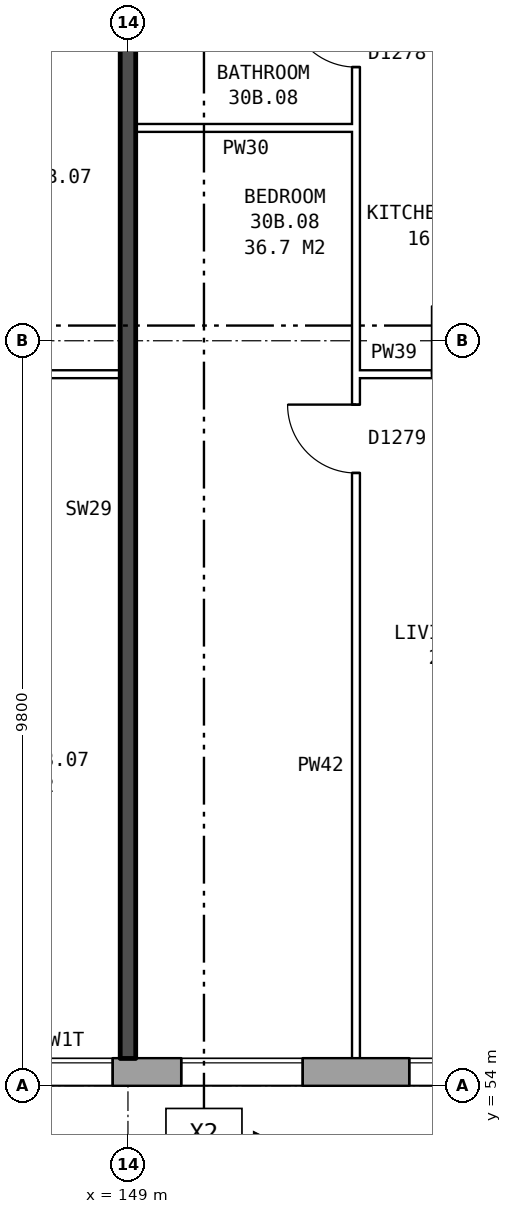
"""IFC4 building model, lengths in metres.
Left out: names, types, materials, properties, quantities, classifications, styles, units other than length and angle.
Written with IfcOpenShell. Run it as: python <this file> out.ifc"""

import sys

from ifc_helpers import new_model, si_unit, direction, frame, frame_2d, origin, place, context, subcontext, project, spatial, rectangle, extrude, element, fill, save


model = new_model("IFC4")
c1 = context("Model", 3, precision=1e-05, world=origin(), true_north=direction((0.0, 1.0)))
c2 = subcontext(c1, "Body", "Model", "MODEL_VIEW")
j1 = project(units=[si_unit("LENGTHUNIT", "METRE"), si_unit("PLANEANGLEUNIT", "RADIAN")], contexts=[c1])
p1 = place(None, origin())
s1 = spatial("IfcSite", under=j1, at=p1, CompositionType="ELEMENT")
p2 = place(p1, origin())
s2 = spatial("IfcBuilding", under=s1, at=p2, CompositionType="ELEMENT")
p3 = place(p2, frame((0.0, 0.0, 108.8)))
s3 = spatial("IfcBuildingStorey", under=s2, at=p3, CompositionType="ELEMENT", Elevation=108.8)
p4 = place(p3, frame((134.075, 54.18, 0.0), z_axis=(0.0, 0.0, 1.0), x_axis=(1.0, 0.0, 0.0)))
e1 = element("IfcWall", 1, at=p4, inside=s3, PredefinedType="STANDARD", context=c2, shape_type="SweptSolid", body=[
    extrude(rectangle(XDim=36.851, YDim=0.36, at=frame_2d((18.425, 0.0))), origin(), (0.0, 0.0, 1.0), 2.85),
])
p5 = place(p4, frame((0.625, 0.0, 0.8)))
e2 = element("IfcOpeningElement", 2, at=p5, cuts=e1, PredefinedType="OPENING", context=c2, shape_type="SweptSolid", body=[
    extrude(rectangle(XDim=1.6, YDim=1.8, at=frame_2d((0.8, 0.9))), frame((0.0, 0.19, 0.0), z_axis=(0.0, -1.0, 0.0), x_axis=(1.0, 0.0, 0.0)), (0.0, 0.0, 1.0), 0.38),
])
p6 = place(p4, frame((3.625, 0.0, 0.8)))
e3 = element("IfcOpeningElement", 3, at=p6, cuts=e1, PredefinedType="OPENING", context=c2, shape_type="SweptSolid", body=[
    extrude(rectangle(XDim=1.6, YDim=1.8, at=frame_2d((0.8, 0.9))), frame((0.0, 0.19, 0.0), z_axis=(0.0, -1.0, 0.0), x_axis=(1.0, 0.0, 0.0)), (0.0, 0.0, 1.0), 0.38),
])
p7 = place(p4, frame((6.625, 0.0, 0.8)))
e4 = element("IfcOpeningElement", 4, at=p7, cuts=e1, PredefinedType="OPENING", context=c2, shape_type="SweptSolid", body=[
    extrude(rectangle(XDim=1.6, YDim=1.8, at=frame_2d((0.8, 0.9))), frame((0.0, 0.19, 0.0), z_axis=(0.0, -1.0, 0.0), x_axis=(1.0, 0.0, 0.0)), (0.0, 0.0, 1.0), 0.38),
])
p8 = place(p4, frame((9.625, 0.0, 0.8)))
e5 = element("IfcOpeningElement", 5, at=p8, cuts=e1, PredefinedType="OPENING", context=c2, shape_type="SweptSolid", body=[
    extrude(rectangle(XDim=1.6, YDim=1.8, at=frame_2d((0.8, 0.9))), frame((0.0, 0.19, 0.0), z_axis=(0.0, -1.0, 0.0), x_axis=(1.0, 0.0, 0.0)), (0.0, 0.0, 1.0), 0.38),
])
p9 = place(p4, frame((12.075, 0.0, 1.65)))
e6 = element("IfcOpeningElement", 6, at=p9, cuts=e1, PredefinedType="OPENING", context=c2, shape_type="SweptSolid", body=[
    extrude(rectangle(XDim=1.0, YDim=0.9, at=frame_2d((0.5, 0.45))), frame((0.0, 0.19, 0.0), z_axis=(0.0, -1.0, 0.0), x_axis=(1.0, 0.0, 0.0)), (0.0, 0.0, 1.0), 0.38),
])
p10 = place(p4, frame((15.625, 0.0, 0.8)))
e7 = element("IfcOpeningElement", 7, at=p10, cuts=e1, PredefinedType="OPENING", context=c2, shape_type="SweptSolid", body=[
    extrude(rectangle(XDim=1.6, YDim=1.8, at=frame_2d((0.8, 0.9))), frame((0.0, 0.19, 0.0), z_axis=(0.0, -1.0, 0.0), x_axis=(1.0, 0.0, 0.0)), (0.0, 0.0, 1.0), 0.38),
])
p11 = place(p4, frame((18.625, 0.0, 0.8)))
e8 = element("IfcOpeningElement", 8, at=p11, cuts=e1, PredefinedType="OPENING", context=c2, shape_type="SweptSolid", body=[
    extrude(rectangle(XDim=1.6, YDim=1.8, at=frame_2d((0.8, 0.9))), frame((0.0, 0.19, 0.0), z_axis=(0.0, -1.0, 0.0), x_axis=(1.0, 0.0, 0.0)), (0.0, 0.0, 1.0), 0.38),
])
p12 = place(p4, frame((21.125, 0.0, 0.8)))
e9 = element("IfcOpeningElement", 9, at=p12, cuts=e1, PredefinedType="OPENING", context=c2, shape_type="SweptSolid", body=[
    extrude(rectangle(XDim=1.4, YDim=0.9, at=frame_2d((0.7, 0.45))), frame((0.0, 0.19, 0.0), z_axis=(0.0, -1.0, 0.0), x_axis=(1.0, 0.0, 0.0)), (0.0, 0.0, 1.0), 0.38),
])
p13 = place(p4, frame((24.625, 0.0, 0.8)))
e10 = element("IfcOpeningElement", 10, at=p13, cuts=e1, PredefinedType="OPENING", context=c2, shape_type="SweptSolid", body=[
    extrude(rectangle(XDim=1.6, YDim=1.8, at=frame_2d((0.8, 0.9))), frame((0.0, 0.19, 0.0), z_axis=(0.0, -1.0, 0.0), x_axis=(1.0, 0.0, 0.0)), (0.0, 0.0, 1.0), 0.38),
])
p14 = place(p4, frame((27.625, 0.0, 0.8)))
e11 = element("IfcOpeningElement", 11, at=p14, cuts=e1, PredefinedType="OPENING", context=c2, shape_type="SweptSolid", body=[
    extrude(rectangle(XDim=1.6, YDim=1.8, at=frame_2d((0.8, 0.9))), frame((0.0, 0.19, 0.0), z_axis=(0.0, -1.0, 0.0), x_axis=(1.0, 0.0, 0.0)), (0.0, 0.0, 1.0), 0.38),
])
p15 = place(p4, frame((30.625, 0.0, 0.8)))
e12 = element("IfcOpeningElement", 12, at=p15, cuts=e1, PredefinedType="OPENING", context=c2, shape_type="SweptSolid", body=[
    extrude(rectangle(XDim=1.6, YDim=1.8, at=frame_2d((0.8, 0.9))), frame((0.0, 0.19, 0.0), z_axis=(0.0, -1.0, 0.0), x_axis=(1.0, 0.0, 0.0)), (0.0, 0.0, 1.0), 0.38),
])
p16 = place(p4, frame((33.625, 0.0, 0.8)))
e13 = element("IfcOpeningElement", 13, at=p16, cuts=e1, PredefinedType="OPENING", context=c2, shape_type="SweptSolid", body=[
    extrude(rectangle(XDim=1.6, YDim=1.8, at=frame_2d((0.8, 0.9))), frame((0.0, 0.19, 0.0), z_axis=(0.0, -1.0, 0.0), x_axis=(1.0, 0.0, 0.0)), (0.0, 0.0, 1.0), 0.38),
])
p17 = place(p4, frame((13.525, 0.0, 0.15)))
e14 = element("IfcOpeningElement", 14, at=p17, cuts=e1, PredefinedType="OPENING", context=c2, shape_type="SweptSolid", body=[
    extrude(rectangle(XDim=1.2, YDim=0.9, at=frame_2d((0.6, 0.45))), frame((0.0, 0.19, 0.0), z_axis=(0.0, -1.0, 0.0), x_axis=(1.0, 0.0, 0.0)), (0.0, 0.0, 1.0), 0.38),
])
p18 = place(p4, frame((23.725, 0.0, 1.7)))
e15 = element("IfcOpeningElement", 15, at=p18, cuts=e1, PredefinedType="OPENING", context=c2, shape_type="SweptSolid", body=[
    extrude(rectangle(XDim=0.6, YDim=0.9, at=frame_2d((0.3, 0.45))), frame((0.0, 0.19, 0.0), z_axis=(0.0, -1.0, 0.0), x_axis=(1.0, 0.0, 0.0)), (0.0, 0.0, 1.0), 0.38),
])
p19 = place(p3, frame((146.0, 63.36, 0.0), z_axis=(0.0, 0.0, 1.0), x_axis=(1.0, 0.0, 0.0)))
e16 = element("IfcWall", 16, at=p19, inside=s3, PredefinedType="PARTITIONING", context=c2, shape_type="SweptSolid", body=[
    extrude(rectangle(XDim=2.9, YDim=0.1, at=frame_2d((1.45, 0.0))), origin(), (0.0, 0.0, 1.0), 2.85),
])
p20 = place(p19, frame((1.0, 0.0, 0.0)))
e17 = element("IfcOpeningElement", 17, at=p20, cuts=e16, PredefinedType="OPENING", context=c2, shape_type="SweptSolid", body=[
    extrude(rectangle(XDim=0.9, YDim=2.1, at=frame_2d((0.45, 1.05))), frame((0.0, 0.06, 0.0), z_axis=(0.0, -1.0, 0.0), x_axis=(1.0, 0.0, 0.0)), (0.0, 0.0, 1.0), 0.12),
])
p21 = place(p3, frame((152.0, 63.36, 0.0), z_axis=(0.0, 0.0, 1.0), x_axis=(1.0, 0.0, 0.0)))
e18 = element("IfcWall", 18, at=p21, inside=s3, PredefinedType="PARTITIONING", context=c2, shape_type="SweptSolid", body=[
    extrude(rectangle(XDim=2.9, YDim=0.1, at=frame_2d((1.45, 0.0))), origin(), (0.0, 0.0, 1.0), 2.85),
])
p22 = place(p21, frame((1.0, 0.0, 0.0)))
e19 = element("IfcOpeningElement", 19, at=p22, cuts=e18, PredefinedType="OPENING", context=c2, shape_type="SweptSolid", body=[
    extrude(rectangle(XDim=0.9, YDim=2.1, at=frame_2d((0.45, 1.05))), frame((0.0, 0.06, 0.0), z_axis=(0.0, -1.0, 0.0), x_axis=(1.0, 0.0, 0.0)), (0.0, 0.0, 1.0), 0.12),
])
p23 = place(p3, frame((149.1, 66.6, 0.0), z_axis=(0.0, 0.0, 1.0), x_axis=(1.0, 0.0, 0.0)))
e20 = element("IfcWall", 20, at=p23, inside=s3, PredefinedType="PARTITIONING", context=c2, shape_type="SweptSolid", body=[
    extrude(rectangle(XDim=2.9, YDim=0.1, at=frame_2d((1.45, 0.0))), origin(), (0.0, 0.0, 1.0), 2.85),
])
p24 = place(p3, frame((149.0, 54.36, 0.0), z_axis=(0.0, 0.0, 1.0), x_axis=(0.0, 1.0, 0.0)))
e21 = element("IfcWall", 21, at=p24, inside=s3, PredefinedType="SOLIDWALL", context=c2, shape_type="SweptSolid", body=[
    extrude(rectangle(XDim=14.44, YDim=0.2, at=frame_2d((7.22, 0.0))), origin(), (0.0, 0.0, 1.0), 2.85),
])
p25 = place(p3, frame((152.0, 54.36, 0.0), z_axis=(0.0, 0.0, 1.0), x_axis=(0.0, 1.0, 0.0)))
e22 = element("IfcWall", 22, at=p25, inside=s3, PredefinedType="PARTITIONING", context=c2, shape_type="SweptSolid", body=[
    extrude(rectangle(XDim=14.34, YDim=0.1, at=frame_2d((7.17, 0.0))), origin(), (0.0, 0.0, 1.0), 2.85),
])
p26 = place(p25, frame((7.7, 0.0, 0.0)))
e23 = element("IfcOpeningElement", 23, at=p26, cuts=e22, PredefinedType="OPENING", context=c2, shape_type="SweptSolid", body=[
    extrude(rectangle(XDim=0.9, YDim=2.1, at=frame_2d((0.45, 1.05))), frame((0.0, 0.06, 0.0), z_axis=(0.0, -1.0, 0.0), x_axis=(1.0, 0.0, 0.0)), (0.0, 0.0, 1.0), 0.12),
])
p27 = place(p25, frame((13.04, 0.0, 0.0)))
e24 = element("IfcOpeningElement", 24, at=p27, cuts=e22, PredefinedType="OPENING", context=c2, shape_type="SweptSolid", body=[
    extrude(rectangle(XDim=0.9, YDim=2.1, at=frame_2d((0.45, 1.05))), frame((0.0, 0.06, 0.0), z_axis=(0.0, -1.0, 0.0), x_axis=(1.0, 0.0, 0.0)), (0.0, 0.0, 1.0), 0.12),
])
p28 = place(p10, origin())
e25 = element("IfcWindow", 25, at=p28, inside=s3, PartitioningType="SINGLE_PANEL", PredefinedType="WINDOW", context=c2, shape_type="SweptSolid", body=[
    extrude(rectangle(XDim=1.6, YDim=1.8, at=frame_2d((0.8, 0.9))), frame((0.0, 0.15, 0.0), z_axis=(0.0, -1.0, 0.0), x_axis=(1.0, 0.0, 0.0)), (0.0, 0.0, 1.0), 0.06),
])
fill(e7, e25)
p29 = place(p11, origin())
e26 = element("IfcWindow", 26, at=p29, inside=s3, PartitioningType="SINGLE_PANEL", PredefinedType="WINDOW", context=c2, shape_type="SweptSolid", body=[
    extrude(rectangle(XDim=1.6, YDim=1.8, at=frame_2d((0.8, 0.9))), frame((0.0, 0.15, 0.0), z_axis=(0.0, -1.0, 0.0), x_axis=(1.0, 0.0, 0.0)), (0.0, 0.0, 1.0), 0.06),
])
fill(e8, e26)
p30 = place(p26, origin())
e27 = element("IfcDoor", 27, at=p30, inside=s3, OperationType="SINGLE_SWING_RIGHT", PredefinedType="DOOR", context=c2, shape_type="SweptSolid", body=[
    extrude(rectangle(XDim=0.9, YDim=2.1, at=frame_2d((0.45, 1.05))), frame((0.0, 0.025, 0.0), z_axis=(0.0, -1.0, 0.0), x_axis=(1.0, 0.0, 0.0)), (0.0, 0.0, 1.0), 0.05),
])
fill(e23, e27)
p31 = place(p27, origin())
e28 = element("IfcDoor", 28, at=p31, inside=s3, OperationType="SINGLE_SWING_RIGHT", PredefinedType="DOOR", context=c2, shape_type="SweptSolid", body=[
    extrude(rectangle(XDim=0.9, YDim=2.1, at=frame_2d((0.45, 1.05))), frame((0.0, 0.025, 0.0), z_axis=(0.0, -1.0, 0.0), x_axis=(1.0, 0.0, 0.0)), (0.0, 0.0, 1.0), 0.05),
])
fill(e24, e28)
p32 = place(p17, origin())
e29 = element("IfcWindow", 29, at=p32, inside=s3, PartitioningType="SINGLE_PANEL", PredefinedType="WINDOW", context=c2, shape_type="SweptSolid", body=[
    extrude(rectangle(XDim=1.2, YDim=0.9, at=frame_2d((0.6, 0.45))), frame((0.0, 0.15, 0.0), z_axis=(0.0, -1.0, 0.0), x_axis=(1.0, 0.0, 0.0)), (0.0, 0.0, 1.0), 0.06),
])
fill(e14, e29)
save(model, sys.argv[1])
